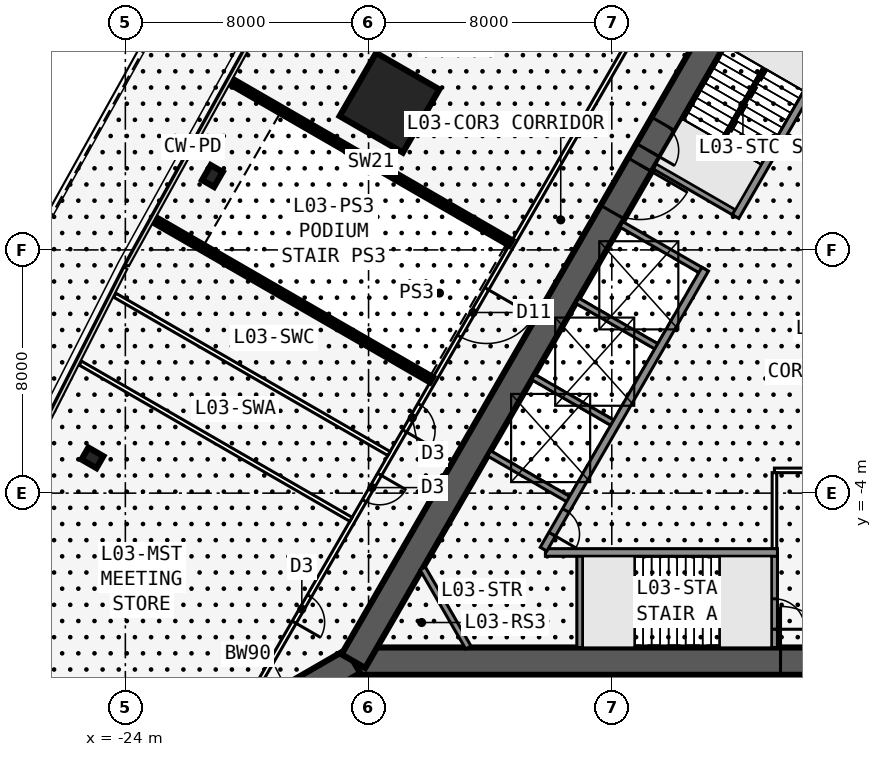
"""IFC4 building model, lengths in metres.
Left out: names, types, materials, properties, quantities, classifications, styles, units other than length and angle.
Written with IfcOpenShell. Run it as: python <this file> out.ifc"""

import sys

from ifc_helpers import new_model, si_unit, direction, frame, frame_2d, origin, origin_2d, place, context, subcontext, project, spatial, rectangle, i_section, extrude, element, fill, save


model = new_model("IFC4")
c1 = context("Model", 3, precision=1e-05, world=origin(), true_north=direction((0.0, 1.0)))
c2 = subcontext(c1, "Body", "Model", "MODEL_VIEW")
j1 = project(units=[si_unit("LENGTHUNIT", "METRE"), si_unit("PLANEANGLEUNIT", "RADIAN")], contexts=[c1])
p1 = place(None, origin())
s1 = spatial("IfcSite", under=j1, at=p1, CompositionType="ELEMENT")
p2 = place(p1, origin())
s2 = spatial("IfcBuilding", under=s1, at=p2, CompositionType="ELEMENT")
p3 = place(p2, frame((0.0, 0.0, 17.5)))
s3 = spatial("IfcBuildingStorey", under=s2, at=p3, CompositionType="ELEMENT", Elevation=17.5)
p4 = place(p3, frame((-16.5, -9.526, 0.0), z_axis=(0.0, 0.0, 1.0), x_axis=(1.0, 0.0, 0.0)))
e1 = element("IfcWall", 1, at=p4, inside=s3, PredefinedType="SHEAR", context=c2, shape_type="SweptSolid", body=[
    extrude(rectangle(XDim=33.0, YDim=0.9, at=frame_2d((16.5, 0.0))), origin(), (0.0, 0.0, 1.0), 5.0),
])
p5 = place(p4, frame((14.05, 0.0, 0.0)))
e2 = element("IfcOpeningElement", 2, at=p5, cuts=e1, PredefinedType="OPENING", context=c2, shape_type="SweptSolid", body=[
    extrude(rectangle(XDim=1.8, YDim=2.13, at=frame_2d((0.9, 1.065))), frame((0.0, 0.46, 0.0), z_axis=(0.0, -1.0, 0.0), x_axis=(1.0, 0.0, 0.0)), (0.0, 0.0, 1.0), 0.92),
])
p6 = place(p3, frame((-10.183, -5.951, 0.0), z_axis=(0.0, 0.0, 1.0), x_axis=(1.0, 0.0, 0.0)))
e3 = element("IfcWall", 3, at=p6, inside=s3, PredefinedType="SOLIDWALL", context=c2, shape_type="SweptSolid", body=[
    extrude(rectangle(XDim=7.633, YDim=0.25, at=frame_2d((3.816, 0.0))), origin(), (0.0, 0.0, 1.0), 4.75),
])
p7 = place(p3, frame((-9.05, -5.951, 0.0), z_axis=(0.0, 0.0, 1.0), x_axis=(0.0, -1.0, 0.0)))
e4 = element("IfcWall", 4, at=p7, inside=s3, PredefinedType="SOLIDWALL", context=c2, shape_type="SweptSolid", body=[
    extrude(rectangle(XDim=3.125, YDim=0.2, at=frame_2d((1.562, 0.0))), origin(), (0.0, 0.0, 1.0), 4.75),
])
p8 = place(p3, frame((-2.65, -5.951, 0.0), z_axis=(0.0, 0.0, 1.0), x_axis=(0.0, -1.0, 0.0)))
e5 = element("IfcWall", 5, at=p8, inside=s3, PredefinedType="SOLIDWALL", context=c2, shape_type="SweptSolid", body=[
    extrude(rectangle(XDim=3.125, YDim=0.2, at=frame_2d((1.562, 0.0))), origin(), (0.0, 0.0, 1.0), 4.75),
])
p9 = place(p8, frame((1.525, 0.0, 0.0)))
e6 = element("IfcOpeningElement", 6, at=p9, cuts=e5, PredefinedType="OPENING", context=c2, shape_type="SweptSolid", body=[
    extrude(rectangle(XDim=1.0, YDim=2.13, at=frame_2d((0.5, 1.065))), frame((0.0, 0.11, 0.0), z_axis=(0.0, -1.0, 0.0), x_axis=(1.0, 0.0, 0.0)), (0.0, 0.0, 1.0), 0.22),
])
p10 = place(p3, frame((0.0, 19.052, 0.0), z_axis=(0.0, 0.0, 1.0), x_axis=(-0.499999749417, -0.866025548458, 0.0)))
e7 = element("IfcWall", 7, at=p10, inside=s3, PredefinedType="SHEAR", context=c2, shape_type="SweptSolid", body=[
    extrude(rectangle(XDim=33.0, YDim=0.9, at=frame_2d((16.5, 0.0))), origin(), (0.0, 0.0, 1.0), 5.0),
])
p11 = place(p10, frame((14.15, 0.0, 0.0)))
e8 = element("IfcOpeningElement", 8, at=p11, cuts=e7, PredefinedType="OPENING", context=c2, shape_type="SweptSolid", body=[
    extrude(rectangle(XDim=1.8, YDim=2.13, at=frame_2d((0.9, 1.065))), frame((0.0, 0.46, 0.0), z_axis=(0.0, -1.0, 0.0), x_axis=(1.0, 0.0, 0.0)), (0.0, 0.0, 1.0), 0.92),
])
p12 = place(p10, frame((12.6, 0.0, 0.0)))
e9 = element("IfcOpeningElement", 9, at=p12, cuts=e7, PredefinedType="OPENING", context=c2, shape_type="SweptSolid", body=[
    extrude(rectangle(XDim=1.0, YDim=2.13, at=frame_2d((0.5, 1.065))), frame((0.0, 0.46, 0.0), z_axis=(0.0, -1.0, 0.0), x_axis=(1.0, 0.0, 0.0)), (0.0, 0.0, 1.0), 0.92),
])
p13 = place(p3, frame((-0.062, 11.794, 0.0), z_axis=(0.0, 0.0, 1.0), x_axis=(-0.500006680225, -0.86602154692, 0.0)))
e10 = element("IfcWall", 10, at=p13, inside=s3, PredefinedType="SOLIDWALL", context=c2, shape_type="SweptSolid", body=[
    extrude(rectangle(XDim=7.733, YDim=0.25, at=frame_2d((3.866, 0.0))), origin(), (0.0, 0.0, 1.0), 4.75),
])
p14 = place(p3, frame((-4.929, 3.365, 0.0), z_axis=(0.0, 0.0, 1.0), x_axis=(-0.499991433582, -0.866030349552, 0.0)))
e11 = element("IfcWall", 11, at=p14, inside=s3, PredefinedType="SOLIDWALL", context=c2, shape_type="SweptSolid", body=[
    extrude(rectangle(XDim=10.633, YDim=0.25, at=frame_2d((5.316, 0.0))), origin(), (0.0, 0.0, 1.0), 4.75),
])
p15 = place(p14, frame((9.164, 0.0, 0.0)))
e12 = element("IfcOpeningElement", 12, at=p15, cuts=e11, PredefinedType="OPENING", context=c2, shape_type="SweptSolid", body=[
    extrude(rectangle(XDim=0.9, YDim=2.13, at=frame_2d((0.45, 1.065))), frame((0.0, 0.135, 0.0), z_axis=(0.0, -1.0, 0.0), x_axis=(1.0, 0.0, 0.0)), (0.0, 0.0, 1.0), 0.27),
])
for number, where, z_axis, x_axis in (
    (13, (-3.879, 5.184, 0.0), (0.0, 0.0, 1.0), (-0.866, 0.5, 0.0)),
    (14, (-4.979, 3.279, 0.0), (0.0, 0.0, 1.0), (-0.866, 0.5, 0.0)),
    (15, (-6.429, 0.767, 0.0), (0.0, 0.0, 1.0), (-0.866, 0.5, 0.0)),
    (16, (-7.879, -1.744, 0.0), (0.0, 0.0, 1.0), (-0.866, 0.5, 0.0)),
    (17, (-9.329, -4.256, 0.0), (0.0, 0.0, 1.0), (-0.866, 0.5, 0.0)),
):
    element("IfcWall", number, at=place(p3, frame(where, z_axis=z_axis, x_axis=x_axis)), inside=s3, PredefinedType="SOLIDWALL", context=c2, shape_type="SweptSolid", body=[
        extrude(rectangle(XDim=3.125, YDim=0.2, at=frame_2d((1.562, 0.0))), origin(), (0.0, 0.0, 1.0), 4.75),
    ])
p16 = place(p3, frame((-16.5, -9.526, 0.0), z_axis=(0.0, 0.0, 1.0), x_axis=(-0.866031398331, -0.499989616998, 0.0)))
e18 = element("IfcWall", 18, at=p16, inside=s3, PredefinedType="SHEAR", context=c2, shape_type="SweptSolid", body=[
    extrude(rectangle(XDim=4.746, YDim=0.9, at=frame_2d((2.373, 0.0))), origin(), (0.0, 0.0, 1.0), 5.0),
])
p17 = place(p16, frame((1.8, 0.0, 0.0)))
e19 = element("IfcOpeningElement", 19, at=p17, cuts=e18, PredefinedType="OPENING", context=c2, shape_type="SweptSolid", body=[
    extrude(rectangle(XDim=1.8, YDim=2.13, at=frame_2d((0.9, 1.065))), frame((0.0, 0.46, 0.0), z_axis=(0.0, -1.0, 0.0), x_axis=(1.0, 0.0, 0.0)), (0.0, 0.0, 1.0), 0.92),
])
for number, where, z_axis, x_axis in (
    (20, (-21.137, 6.43, 0.0), (0.0, 0.0, 1.0), (-0.866, 0.5, 0.0)),
    (21, (-25.083, -2.839, 0.0), (0.0, 0.0, 1.0), (-0.5, -0.866, 0.0)),
):
    element("IfcColumn", number, at=place(p3, frame(where, z_axis=z_axis, x_axis=x_axis)), inside=s3, PredefinedType="COLUMN", context=c2, shape_type="SweptSolid", body=[
        extrude(i_section(OverallWidth=0.455, OverallDepth=0.569, WebThickness=0.078, FlangeThickness=0.125, at=origin_2d()), origin(), (0.0, 0.0, 1.0), 5.0),
    ])
p18 = place(p3, frame((-15.312, 8.84, 0.0), z_axis=(0.0, 0.0, 1.0), x_axis=(-0.866025403784, 0.5, 0.0)))
e22 = element("IfcColumn", 22, at=p18, inside=s3, PredefinedType="COLUMN", context=c2, shape_type="SweptSolid", body=[
    extrude(rectangle(XDim=2.4, YDim=2.4, at=origin_2d()), origin(), (0.0, 0.0, 1.0), 5.0),
])
p19 = place(p3, frame((-0.5, 22.836, 0.0), z_axis=(0.0, 0.0, 1.0), x_axis=(-0.500001677587, -0.866024435227, 0.0)))
e23 = element("IfcWall", 23, at=p19, inside=s3, PredefinedType="PARTITIONING", context=c2, shape_type="SweptSolid", body=[
    extrude(rectangle(XDim=39.054, YDim=0.15, at=frame_2d((19.527, 0.0))), origin(), (0.0, 0.0, 1.0), 4.75),
])
p20 = place(p19, frame((10.414, 0.0, 0.0)))
e24 = element("IfcOpeningElement", 24, at=p20, cuts=e23, PredefinedType="OPENING", context=c2, shape_type="SweptSolid", body=[
    extrude(rectangle(XDim=1.0, YDim=2.13, at=frame_2d((0.5, 1.065))), frame((0.0, 0.085, 0.0), z_axis=(0.0, -1.0, 0.0), x_axis=(1.0, 0.0, 0.0)), (0.0, 0.0, 1.0), 0.17),
])
p21 = place(p19, frame((23.227, 0.0, 0.0)))
e25 = element("IfcOpeningElement", 25, at=p21, cuts=e23, PredefinedType="OPENING", context=c2, shape_type="SweptSolid", body=[
    extrude(rectangle(XDim=1.8, YDim=2.13, at=frame_2d((0.9, 1.065))), frame((0.0, 0.085, 0.0), z_axis=(0.0, -1.0, 0.0), x_axis=(1.0, 0.0, 0.0)), (0.0, 0.0, 1.0), 0.17),
])
p22 = place(p19, frame((27.627, 0.0, 0.0)))
e26 = element("IfcOpeningElement", 26, at=p22, cuts=e23, PredefinedType="OPENING", context=c2, shape_type="SweptSolid", body=[
    extrude(rectangle(XDim=1.0, YDim=2.13, at=frame_2d((0.5, 1.065))), frame((0.0, 0.085, 0.0), z_axis=(0.0, -1.0, 0.0), x_axis=(1.0, 0.0, 0.0)), (0.0, 0.0, 1.0), 0.17),
])
p23 = place(p19, frame((30.277, 0.0, 0.0)))
e27 = element("IfcOpeningElement", 27, at=p23, cuts=e23, PredefinedType="OPENING", context=c2, shape_type="SweptSolid", body=[
    extrude(rectangle(XDim=1.0, YDim=2.13, at=frame_2d((0.5, 1.065))), frame((0.0, 0.085, 0.0), z_axis=(0.0, -1.0, 0.0), x_axis=(1.0, 0.0, 0.0)), (0.0, 0.0, 1.0), 0.17),
])
p24 = place(p19, frame((34.89, 0.0, 0.0)))
e28 = element("IfcOpeningElement", 28, at=p24, cuts=e23, PredefinedType="OPENING", context=c2, shape_type="SweptSolid", body=[
    extrude(rectangle(XDim=1.0, YDim=2.13, at=frame_2d((0.5, 1.065))), frame((0.0, 0.085, 0.0), z_axis=(0.0, -1.0, 0.0), x_axis=(1.0, 0.0, 0.0)), (0.0, 0.0, 1.0), 0.17),
])
p25 = place(p3, frame((-11.329, 4.231, 0.0), z_axis=(0.0, 0.0, 1.0), x_axis=(-0.866022509016, 0.500005013853, 0.0)))
e29 = element("IfcWall", 29, at=p25, inside=s3, PredefinedType="SHEAR", context=c2, shape_type="SweptSolid", body=[
    extrude(rectangle(XDim=10.596, YDim=0.2, at=frame_2d((5.298, 0.0))), origin(), (0.0, 0.0, 1.0), 5.0),
])
p26 = place(p3, frame((-13.928, -0.272, 0.0), z_axis=(0.0, 0.0, 1.0), x_axis=(-0.866031513124, 0.499989418164, 0.0)))
e30 = element("IfcWall", 30, at=p26, inside=s3, PredefinedType="SHEAR", context=c2, shape_type="SweptSolid", body=[
    extrude(rectangle(XDim=10.502, YDim=0.2, at=frame_2d((5.251, 0.0))), origin(), (0.0, 0.0, 1.0), 5.0),
])
p27 = place(p3, frame((-15.329, -2.697, 0.0), z_axis=(0.0, 0.0, 1.0), x_axis=(-0.866025500669, 0.49999983219, 0.0)))
e31 = element("IfcWall", 31, at=p27, inside=s3, PredefinedType="PARTITIONING", context=c2, shape_type="SweptSolid", body=[
    extrude(rectangle(XDim=10.413, YDim=0.15, at=frame_2d((5.206, 0.0))), origin(), (0.0, 0.0, 1.0), 3.808),
])
p28 = place(p3, frame((-16.579, -4.862, 0.0), z_axis=(0.0, 0.0, 1.0), x_axis=(-0.866019836563, 0.500009642587, 0.0)))
e32 = element("IfcWall", 32, at=p28, inside=s3, PredefinedType="PARTITIONING", context=c2, shape_type="SweptSolid", body=[
    extrude(rectangle(XDim=10.278, YDim=0.15, at=frame_2d((5.139, 0.0))), origin(), (0.0, 0.0, 1.0), 4.75),
])
p29 = place(p3, frame((-2.65, -3.251, 0.0), z_axis=(0.0, 0.0, 1.0), x_axis=(1.0, 0.0, 0.0)))
e33 = element("IfcWall", 33, at=p29, inside=s3, PredefinedType="PARTITIONING", context=c2, shape_type="SweptSolid", body=[
    extrude(rectangle(XDim=8.35, YDim=0.15, at=frame_2d((4.175, 0.0))), origin(), (0.0, 0.0, 1.0), 4.75),
])
p30 = place(p3, frame((-2.65, -5.826, 0.0), z_axis=(0.0, 0.0, 1.0), x_axis=(0.0, 1.0, 0.0)))
e34 = element("IfcWall", 34, at=p30, inside=s3, PredefinedType="PARTITIONING", context=c2, shape_type="SweptSolid", body=[
    extrude(rectangle(XDim=2.5, YDim=0.15, at=frame_2d((1.25, 0.0))), origin(), (0.0, 0.0, 1.0), 4.75),
])
p31 = place(p3, frame((-12.719, -9.076, 0.0), z_axis=(0.0, 0.0, 1.0), x_axis=(-0.499952404951, 0.866052881055, 0.0)))
e35 = element("IfcWall", 35, at=p31, inside=s3, PredefinedType="SOLIDWALL", context=c2, shape_type="SweptSolid", body=[
    extrude(rectangle(XDim=3.002, YDim=0.2, at=frame_2d((1.501, 0.0))), origin(), (0.0, 0.0, 1.0), 4.75),
])
p32 = place(p3, frame((-7.247, -7.576, 0.0), z_axis=(0.0, 0.0, 1.0), x_axis=(1.0, 0.0, 0.0)))
e36 = element("IfcWall", 36, at=p32, inside=s3, PredefinedType="SOLIDWALL", context=c2, shape_type="SweptSolid", body=[
    extrude(rectangle(XDim=2.794, YDim=0.1, at=frame_2d((1.397, 0.0))), origin(), (0.0, 0.0, 1.0), 5.0),
])
p33 = place(p3, frame((-2.988, 9.978, 0.0), z_axis=(0.0, 0.0, 1.0), x_axis=(-0.499992232847, -0.866029888106, 0.0)))
e37 = element("IfcWall", 37, at=p33, inside=s3, PredefinedType="SOLIDWALL", context=c2, shape_type="SweptSolid", body=[
    extrude(rectangle(XDim=2.794, YDim=0.1, at=frame_2d((1.397, 0.0))), origin(), (0.0, 0.0, 1.0), 5.0),
])
p34 = place(p21, origin())
e38 = element("IfcDoor", 38, at=p34, inside=s3, OperationType="DOUBLE_DOOR_SINGLE_SWING", PredefinedType="DOOR", context=c2, shape_type="SweptSolid", body=[
    extrude(rectangle(XDim=1.8, YDim=2.13, at=frame_2d((0.9, 1.065))), frame((0.0, 0.025, 0.0), z_axis=(0.0, -1.0, 0.0), x_axis=(1.0, 0.0, 0.0)), (0.0, 0.0, 1.0), 0.05),
])
fill(e25, e38)
p35 = place(p22, origin())
e39 = element("IfcDoor", 39, at=p35, inside=s3, OperationType="SINGLE_SWING_RIGHT", PredefinedType="DOOR", context=c2, shape_type="SweptSolid", body=[
    extrude(rectangle(XDim=1.0, YDim=2.13, at=frame_2d((0.5, 1.065))), frame((0.0, 0.025, 0.0), z_axis=(0.0, -1.0, 0.0), x_axis=(1.0, 0.0, 0.0)), (0.0, 0.0, 1.0), 0.05),
])
fill(e26, e39)
p36 = place(p23, origin())
e40 = element("IfcDoor", 40, at=p36, inside=s3, OperationType="SINGLE_SWING_LEFT", PredefinedType="DOOR", context=c2, shape_type="SweptSolid", body=[
    extrude(rectangle(XDim=1.0, YDim=2.13, at=frame_2d((0.5, 1.065))), frame((0.0, 0.025, 0.0), z_axis=(0.0, -1.0, 0.0), x_axis=(1.0, 0.0, 0.0)), (0.0, 0.0, 1.0), 0.05),
])
fill(e27, e40)
p37 = place(p24, origin())
e41 = element("IfcDoor", 41, at=p37, inside=s3, OperationType="SINGLE_SWING_RIGHT", PredefinedType="DOOR", context=c2, shape_type="SweptSolid", body=[
    extrude(rectangle(XDim=1.0, YDim=2.13, at=frame_2d((0.5, 1.065))), frame((0.0, 0.025, 0.0), z_axis=(0.0, -1.0, 0.0), x_axis=(1.0, 0.0, 0.0)), (0.0, 0.0, 1.0), 0.05),
])
fill(e28, e41)
p38 = place(p5, origin())
e42 = element("IfcDoor", 42, at=p38, inside=s3, OperationType="DOUBLE_DOOR_SINGLE_SWING", PredefinedType="DOOR", context=c2, shape_type="SweptSolid", body=[
    extrude(rectangle(XDim=1.8, YDim=2.13, at=frame_2d((0.9, 1.065))), frame((0.0, 0.025, 0.0), z_axis=(0.0, -1.0, 0.0), x_axis=(1.0, 0.0, 0.0)), (0.0, 0.0, 1.0), 0.05),
])
fill(e2, e42)
p39 = place(p9, origin())
e43 = element("IfcDoor", 43, at=p39, inside=s3, OperationType="SINGLE_SWING_RIGHT", PredefinedType="DOOR", context=c2, shape_type="SweptSolid", body=[
    extrude(rectangle(XDim=1.0, YDim=2.13, at=frame_2d((0.5, 1.065))), frame((0.0, 0.025, 0.0), z_axis=(0.0, -1.0, 0.0), x_axis=(1.0, 0.0, 0.0)), (0.0, 0.0, 1.0), 0.05),
])
fill(e6, e43)
p40 = place(p11, origin())
e44 = element("IfcDoor", 44, at=p40, inside=s3, OperationType="DOUBLE_DOOR_SINGLE_SWING", PredefinedType="DOOR", context=c2, shape_type="SweptSolid", body=[
    extrude(rectangle(XDim=1.8, YDim=2.13, at=frame_2d((0.9, 1.065))), frame((0.0, 0.025, 0.0), z_axis=(0.0, -1.0, 0.0), x_axis=(1.0, 0.0, 0.0)), (0.0, 0.0, 1.0), 0.05),
])
fill(e8, e44)
p41 = place(p12, origin())
e45 = element("IfcDoor", 45, at=p41, inside=s3, OperationType="SINGLE_SWING_RIGHT", PredefinedType="DOOR", context=c2, shape_type="SweptSolid", body=[
    extrude(rectangle(XDim=1.0, YDim=2.13, at=frame_2d((0.5, 1.065))), frame((0.0, 0.025, 0.0), z_axis=(0.0, -1.0, 0.0), x_axis=(1.0, 0.0, 0.0)), (0.0, 0.0, 1.0), 0.05),
])
fill(e9, e45)
p42 = place(p15, origin())
e46 = element("IfcDoor", 46, at=p42, inside=s3, OperationType="SINGLE_SWING_RIGHT", PredefinedType="DOOR", context=c2, shape_type="SweptSolid", body=[
    extrude(rectangle(XDim=0.9, YDim=2.13, at=frame_2d((0.45, 1.065))), frame((0.0, 0.025, 0.0), z_axis=(0.0, -1.0, 0.0), x_axis=(1.0, 0.0, 0.0)), (0.0, 0.0, 1.0), 0.05),
])
fill(e12, e46)
save(model, sys.argv[1])
